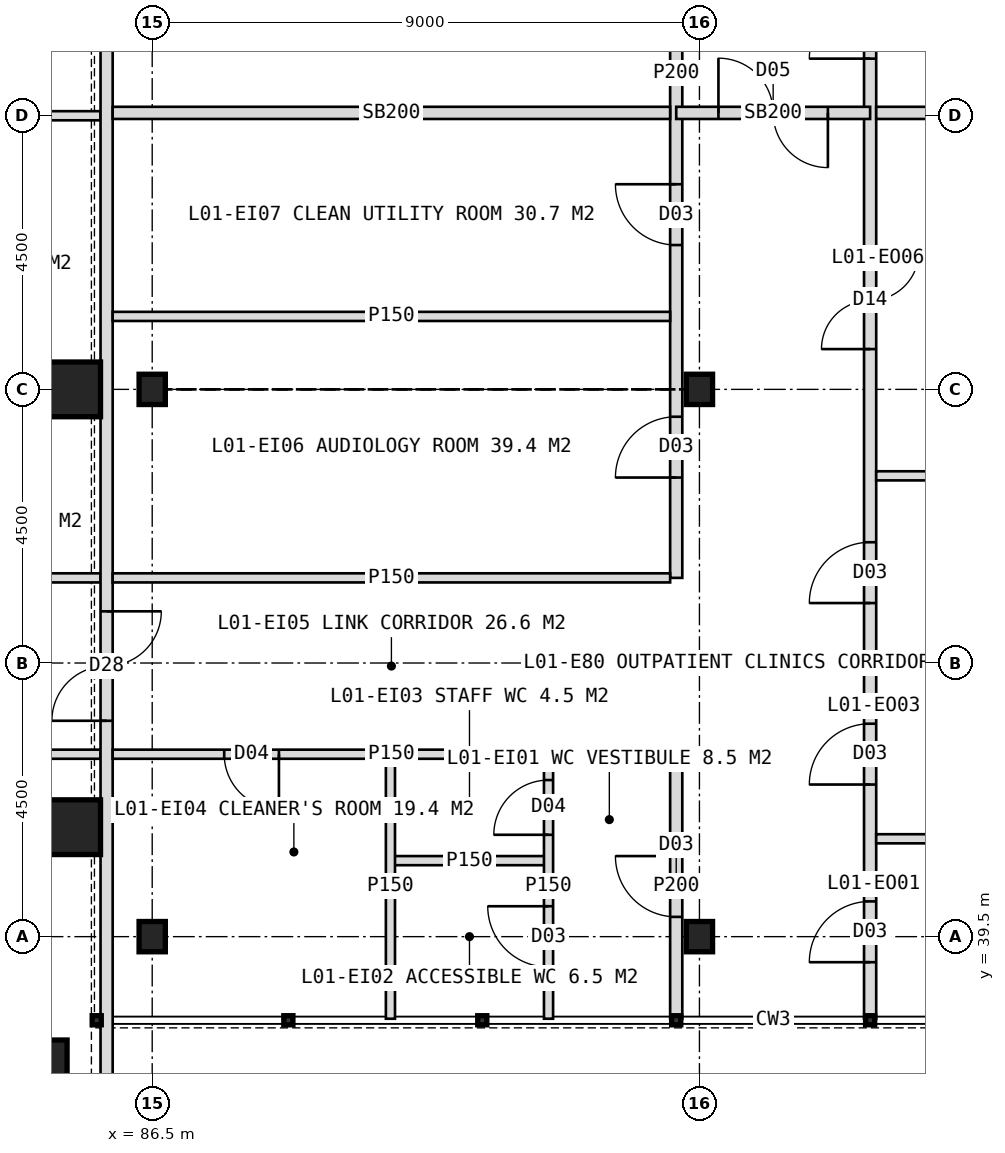
"""IFC4 building model, lengths in metres.
Left out: names, types, materials, properties, quantities, classifications, styles, units other than length and angle.
Written with IfcOpenShell. Run it as: python <this file> out.ifc"""

import sys

from ifc_helpers import new_model, si_unit, direction, frame, frame_2d, origin, origin_2d, place, context, subcontext, project, spatial, rectangle, hollow_rectangle, i_section, extrude, element, fill, save


model = new_model("IFC4")
c1 = context("Model", 3, precision=1e-05, world=origin(), true_north=direction((0.0, 1.0)))
c2 = subcontext(c1, "Body", "Model", "MODEL_VIEW")
j1 = project(units=[si_unit("LENGTHUNIT", "METRE"), si_unit("PLANEANGLEUNIT", "RADIAN")], contexts=[c1])
p1 = place(None, origin())
s1 = spatial("IfcSite", under=j1, at=p1, CompositionType="ELEMENT")
p2 = place(p1, origin())
s2 = spatial("IfcBuilding", under=s1, at=p2, CompositionType="ELEMENT")
p3 = place(p2, frame((0.0, 0.0, 6.0)))
s3 = spatial("IfcBuildingStorey", under=s2, at=p3, CompositionType="ELEMENT", Elevation=6.0)
for number, where, z_axis, x_axis in (
    (1, (85.2, 41.3, 0.0), (0.0, 0.0, 1.0), (1.0, 0.0, 0.0)),
    (2, (85.2, 48.5, 0.0), (0.0, 0.0, 1.0), (1.0, 0.0, 0.0)),
    (3, (84.65, 37.35, 0.0), (0.0, 0.0, 1.0), (1.0, 0.0, 0.0)),
):
    element("IfcColumn", number, at=place(p3, frame(where, z_axis=z_axis, x_axis=x_axis)), inside=s3, PredefinedType="COLUMN", context=c2, shape_type="SweptSolid", body=[
        extrude(hollow_rectangle(XDim=0.9, YDim=0.9, WallThickness=0.08, at=origin_2d()), origin(), (0.0, 0.0, 1.0), 5.0),
    ])
for number, where, z_axis, x_axis in (
    (4, (86.5, 39.5, 0.0), (0.0, 0.0, 1.0), (1.0, 0.0, 0.0)),
    (5, (86.5, 48.5, 0.0), (0.0, 0.0, 1.0), (1.0, 0.0, 0.0)),
    (6, (95.5, 39.5, 0.0), (0.0, 0.0, 1.0), (1.0, 0.0, 0.0)),
    (7, (95.5, 48.5, 0.0), (0.0, 0.0, 1.0), (1.0, 0.0, 0.0)),
):
    element("IfcColumn", number, at=place(p3, frame(where, z_axis=z_axis, x_axis=x_axis)), inside=s3, PredefinedType="COLUMN", context=c2, shape_type="SweptSolid", body=[
        extrude(i_section(OverallWidth=0.432, OverallDepth=0.498, WebThickness=0.056, FlangeThickness=0.089, FilletRadius=0.015, at=origin_2d()), origin(), (0.0, 0.0, 1.0), 5.0),
    ])
for number, where, z_axis, x_axis in (
    (8, (79.5, 53.0, 0.0), (0.0, 0.0, 1.0), (1.0, 0.0, 0.0)),
    (9, (79.5, 45.4, 0.0), (0.0, 0.0, 1.0), (1.0, 0.0, 0.0)),
    (10, (79.5, 42.5, 0.0), (0.0, 0.0, 1.0), (1.0, 0.0, 0.0)),
):
    element("IfcWall", number, at=place(p3, frame(where, z_axis=z_axis, x_axis=x_axis)), inside=s3, PredefinedType="PARTITIONING", context=c2, shape_type="SweptSolid", body=[
        extrude(rectangle(XDim=6.15, YDim=0.15, at=frame_2d((3.075, 0.0))), origin(), (0.0, 0.0, 1.0), 4.7),
    ])
p4 = place(p3, frame((98.307, 38.15, 0.0), z_axis=(0.0, 0.0, 1.0), x_axis=(0.0, 1.0, 0.0)))
e11 = element("IfcWall", 11, at=p4, inside=s3, PredefinedType="PARTITIONING", context=c2, shape_type="SweptSolid", body=[
    extrude(rectangle(XDim=47.7, YDim=0.2, at=frame_2d((23.85, 0.0))), origin(), (0.0, 0.0, 1.0), 4.7),
])
p5 = place(p4, frame((45.7, 0.0, 0.0)))
e12 = element("IfcOpeningElement", 12, at=p5, cuts=e11, PredefinedType="OPENING", context=c2, shape_type="SweptSolid", body=[
    extrude(rectangle(XDim=1.2, YDim=2.1, at=frame_2d((0.6, 1.05))), frame((0.0, 0.11, 0.0), z_axis=(0.0, -1.0, 0.0), x_axis=(1.0, 0.0, 0.0)), (0.0, 0.0, 1.0), 0.22),
])
p6 = place(p4, frame((36.244, 0.0, 0.0)))
e13 = element("IfcOpeningElement", 13, at=p6, cuts=e11, PredefinedType="OPENING", context=c2, shape_type="SweptSolid", body=[
    extrude(rectangle(XDim=1.0, YDim=2.1, at=frame_2d((0.5, 1.05))), frame((0.0, 0.11, 0.0), z_axis=(0.0, -1.0, 0.0), x_axis=(1.0, 0.0, 0.0)), (0.0, 0.0, 1.0), 0.22),
])
p7 = place(p4, frame((0.93, 0.0, 0.0)))
e14 = element("IfcOpeningElement", 14, at=p7, cuts=e11, PredefinedType="OPENING", context=c2, shape_type="SweptSolid", body=[
    extrude(rectangle(XDim=1.0, YDim=2.1, at=frame_2d((0.5, 1.05))), frame((0.0, 0.11, 0.0), z_axis=(0.0, -1.0, 0.0), x_axis=(1.0, 0.0, 0.0)), (0.0, 0.0, 1.0), 0.22),
])
p8 = place(p4, frame((3.852, 0.0, 0.0)))
e15 = element("IfcOpeningElement", 15, at=p8, cuts=e11, PredefinedType="OPENING", context=c2, shape_type="SweptSolid", body=[
    extrude(rectangle(XDim=1.0, YDim=2.1, at=frame_2d((0.5, 1.05))), frame((0.0, 0.11, 0.0), z_axis=(0.0, -1.0, 0.0), x_axis=(1.0, 0.0, 0.0)), (0.0, 0.0, 1.0), 0.22),
])
p9 = place(p4, frame((6.836, 0.0, 0.0)))
e16 = element("IfcOpeningElement", 16, at=p9, cuts=e11, PredefinedType="OPENING", context=c2, shape_type="SweptSolid", body=[
    extrude(rectangle(XDim=1.0, YDim=2.1, at=frame_2d((0.5, 1.05))), frame((0.0, 0.11, 0.0), z_axis=(0.0, -1.0, 0.0), x_axis=(1.0, 0.0, 0.0)), (0.0, 0.0, 1.0), 0.22),
])
p10 = place(p4, frame((11.012, 0.0, 0.0)))
e17 = element("IfcOpeningElement", 17, at=p10, cuts=e11, PredefinedType="OPENING", context=c2, shape_type="SweptSolid", body=[
    extrude(rectangle(XDim=1.6, YDim=2.2, at=frame_2d((0.8, 1.1))), frame((0.0, 0.11, 0.0), z_axis=(0.0, -1.0, 0.0), x_axis=(1.0, 0.0, 0.0)), (0.0, 0.0, 1.0), 0.22),
])
p11 = place(p4, frame((15.789, 0.0, 0.0)))
e18 = element("IfcOpeningElement", 18, at=p11, cuts=e11, PredefinedType="OPENING", context=c2, shape_type="SweptSolid", body=[
    extrude(rectangle(XDim=1.0, YDim=2.1, at=frame_2d((0.5, 1.05))), frame((0.0, 0.11, 0.0), z_axis=(0.0, -1.0, 0.0), x_axis=(1.0, 0.0, 0.0)), (0.0, 0.0, 1.0), 0.22),
])
p12 = place(p4, frame((18.773, 0.0, 0.0)))
e19 = element("IfcOpeningElement", 19, at=p12, cuts=e11, PredefinedType="OPENING", context=c2, shape_type="SweptSolid", body=[
    extrude(rectangle(XDim=1.0, YDim=2.1, at=frame_2d((0.5, 1.05))), frame((0.0, 0.11, 0.0), z_axis=(0.0, -1.0, 0.0), x_axis=(1.0, 0.0, 0.0)), (0.0, 0.0, 1.0), 0.22),
])
p13 = place(p4, frame((21.758, 0.0, 0.0)))
e20 = element("IfcOpeningElement", 20, at=p13, cuts=e11, PredefinedType="OPENING", context=c2, shape_type="SweptSolid", body=[
    extrude(rectangle(XDim=1.0, YDim=2.1, at=frame_2d((0.5, 1.05))), frame((0.0, 0.11, 0.0), z_axis=(0.0, -1.0, 0.0), x_axis=(1.0, 0.0, 0.0)), (0.0, 0.0, 1.0), 0.22),
])
p14 = place(p4, frame((26.034, 0.0, 0.0)))
e21 = element("IfcOpeningElement", 21, at=p14, cuts=e11, PredefinedType="OPENING", context=c2, shape_type="SweptSolid", body=[
    extrude(rectangle(XDim=1.4, YDim=2.2, at=frame_2d((0.7, 1.1))), frame((0.0, 0.11, 0.0), z_axis=(0.0, -1.0, 0.0), x_axis=(1.0, 0.0, 0.0)), (0.0, 0.0, 1.0), 0.22),
])
p15 = place(p4, frame((30.711, 0.0, 0.0)))
e22 = element("IfcOpeningElement", 22, at=p15, cuts=e11, PredefinedType="OPENING", context=c2, shape_type="SweptSolid", body=[
    extrude(rectangle(XDim=1.0, YDim=2.1, at=frame_2d((0.5, 1.05))), frame((0.0, 0.11, 0.0), z_axis=(0.0, -1.0, 0.0), x_axis=(1.0, 0.0, 0.0)), (0.0, 0.0, 1.0), 0.22),
])
p16 = place(p4, frame((33.695, 0.0, 0.0)))
e23 = element("IfcOpeningElement", 23, at=p16, cuts=e11, PredefinedType="OPENING", context=c2, shape_type="SweptSolid", body=[
    extrude(rectangle(XDim=1.0, YDim=2.1, at=frame_2d((0.5, 1.05))), frame((0.0, 0.11, 0.0), z_axis=(0.0, -1.0, 0.0), x_axis=(1.0, 0.0, 0.0)), (0.0, 0.0, 1.0), 0.22),
])
p17 = place(p3, frame((95.118, 38.15, 0.0), z_axis=(0.0, 0.0, 1.0), x_axis=(0.0, 1.0, 0.0)))
e24 = element("IfcWall", 24, at=p17, inside=s3, PredefinedType="PARTITIONING", context=c2, shape_type="SweptSolid", body=[
    extrude(rectangle(XDim=4.35, YDim=0.2, at=frame_2d((2.175, 0.0))), origin(), (0.0, 0.0, 1.0), 4.7),
])
p18 = place(p17, frame((1.675, 0.0, 0.0)))
e25 = element("IfcOpeningElement", 25, at=p18, cuts=e24, PredefinedType="OPENING", context=c2, shape_type="SweptSolid", body=[
    extrude(rectangle(XDim=1.0, YDim=2.1, at=frame_2d((0.5, 1.05))), frame((0.0, 0.11, 0.0), z_axis=(0.0, -1.0, 0.0), x_axis=(1.0, 0.0, 0.0)), (0.0, 0.0, 1.0), 0.22),
])
p19 = place(p3, frame((95.118, 45.4, 0.0), z_axis=(0.0, 0.0, 1.0), x_axis=(0.0, 1.0, 0.0)))
e26 = element("IfcWall", 26, at=p19, inside=s3, PredefinedType="PARTITIONING", context=c2, shape_type="SweptSolid", body=[
    extrude(rectangle(XDim=16.6, YDim=0.2, at=frame_2d((8.3, 0.0))), origin(), (0.0, 0.0, 1.0), 4.7),
])
p20 = place(p19, frame((1.65, 0.0, 0.0)))
e27 = element("IfcOpeningElement", 27, at=p20, cuts=e26, PredefinedType="OPENING", context=c2, shape_type="SweptSolid", body=[
    extrude(rectangle(XDim=1.0, YDim=2.1, at=frame_2d((0.5, 1.05))), frame((0.0, 0.11, 0.0), z_axis=(0.0, -1.0, 0.0), x_axis=(1.0, 0.0, 0.0)), (0.0, 0.0, 1.0), 0.22),
])
p21 = place(p19, frame((5.473, 0.0, 0.0)))
e28 = element("IfcOpeningElement", 28, at=p21, cuts=e26, PredefinedType="OPENING", context=c2, shape_type="SweptSolid", body=[
    extrude(rectangle(XDim=1.0, YDim=2.1, at=frame_2d((0.5, 1.05))), frame((0.0, 0.11, 0.0), z_axis=(0.0, -1.0, 0.0), x_axis=(1.0, 0.0, 0.0)), (0.0, 0.0, 1.0), 0.22),
])
p22 = place(p19, frame((9.924, 0.0, 0.0)))
e29 = element("IfcOpeningElement", 29, at=p22, cuts=e26, PredefinedType="OPENING", context=c2, shape_type="SweptSolid", body=[
    extrude(rectangle(XDim=1.0, YDim=2.1, at=frame_2d((0.5, 1.05))), frame((0.0, 0.11, 0.0), z_axis=(0.0, -1.0, 0.0), x_axis=(1.0, 0.0, 0.0)), (0.0, 0.0, 1.0), 0.22),
])
p23 = place(p19, frame((14.1, 0.0, 0.0)))
e30 = element("IfcOpeningElement", 30, at=p23, cuts=e26, PredefinedType="OPENING", context=c2, shape_type="SweptSolid", body=[
    extrude(rectangle(XDim=1.6, YDim=2.2, at=frame_2d((0.8, 1.1))), frame((0.0, 0.11, 0.0), z_axis=(0.0, -1.0, 0.0), x_axis=(1.0, 0.0, 0.0)), (0.0, 0.0, 1.0), 0.22),
])
p24 = place(p3, frame((98.307, 53.047, 0.0), z_axis=(0.0, 0.0, 1.0), x_axis=(-1.0, 0.0, 0.0)))
e31 = element("IfcWall", 31, at=p24, inside=s3, PredefinedType="SOLIDWALL", context=c2, shape_type="SweptSolid", body=[
    extrude(rectangle(XDim=3.189, YDim=0.2, at=frame_2d((1.594, 0.0))), origin(), (0.0, 0.0, 1.0), 4.7),
])
p25 = place(p24, frame((0.695, 0.0, 0.0)))
e32 = element("IfcOpeningElement", 32, at=p25, cuts=e31, PredefinedType="OPENING", context=c2, shape_type="SweptSolid", body=[
    extrude(rectangle(XDim=1.8, YDim=2.2, at=frame_2d((0.9, 1.1))), frame((0.0, 0.11, 0.0), z_axis=(0.0, -1.0, 0.0), x_axis=(1.0, 0.0, 0.0)), (0.0, 0.0, 1.0), 0.22),
])
p26 = place(p3, frame((85.75, 36.8, 0.0), z_axis=(0.0, 0.0, 1.0), x_axis=(0.0, 1.0, 0.0)))
e33 = element("IfcWall", 33, at=p26, inside=s3, PredefinedType="SOLIDWALL", context=c2, shape_type="SweptSolid", body=[
    extrude(rectangle(XDim=50.4, YDim=0.2, at=frame_2d((25.2, 0.0))), origin(), (0.0, 0.0, 1.0), 4.7),
])
p27 = place(p26, frame((6.25, 0.0, 0.0)))
e34 = element("IfcOpeningElement", 34, at=p27, cuts=e33, PredefinedType="OPENING", context=c2, shape_type="SweptSolid", body=[
    extrude(rectangle(XDim=1.8, YDim=2.2, at=frame_2d((0.9, 1.1))), frame((0.0, 0.11, 0.0), z_axis=(0.0, -1.0, 0.0), x_axis=(1.0, 0.0, 0.0)), (0.0, 0.0, 1.0), 0.22),
])
p28 = place(p26, frame((25.55, 0.0, 0.0)))
e35 = element("IfcOpeningElement", 35, at=p28, cuts=e33, PredefinedType="OPENING", context=c2, shape_type="SweptSolid", body=[
    extrude(rectangle(XDim=1.8, YDim=2.2, at=frame_2d((0.9, 1.1))), frame((0.0, 0.11, 0.0), z_axis=(0.0, -1.0, 0.0), x_axis=(1.0, 0.0, 0.0)), (0.0, 0.0, 1.0), 0.22),
])
for number, where, z_axis, x_axis in (
    (36, (107.85, 41.109, 0.0), (0.0, 0.0, 1.0), (-1.0, 0.0, 0.0)),
    (37, (107.85, 44.094, 0.0), (0.0, 0.0, 1.0), (-1.0, 0.0, 0.0)),
    (38, (107.85, 47.078, 0.0), (0.0, 0.0, 1.0), (-1.0, 0.0, 0.0)),
):
    element("IfcWall", number, at=place(p3, frame(where, z_axis=z_axis, x_axis=x_axis)), inside=s3, PredefinedType="PARTITIONING", context=c2, shape_type="SweptSolid", body=[
        extrude(rectangle(XDim=9.443, YDim=0.15, at=frame_2d((4.722, 0.0))), origin(), (0.0, 0.0, 1.0), 4.7),
    ])
p29 = place(p3, frame((107.85, 53.047, 0.0), z_axis=(0.0, 0.0, 1.0), x_axis=(-1.0, 0.0, 0.0)))
e39 = element("IfcWall", 39, at=p29, inside=s3, PredefinedType="SOLIDWALL", context=c2, shape_type="SweptSolid", body=[
    extrude(rectangle(XDim=9.443, YDim=0.2, at=frame_2d((4.722, 0.0))), origin(), (0.0, 0.0, 1.0), 4.7),
])
p30 = place(p3, frame((93.018, 40.75, 0.0), z_axis=(0.0, 0.0, 1.0), x_axis=(-1.0, 0.0, 0.0)))
e40 = element("IfcWall", 40, at=p30, inside=s3, PredefinedType="PARTITIONING", context=c2, shape_type="SweptSolid", body=[
    extrude(rectangle(XDim=2.6, YDim=0.15, at=frame_2d((1.3, 0.0))), origin(), (0.0, 0.0, 1.0), 4.7),
])
p31 = place(p3, frame((95.018, 42.5, 0.0), z_axis=(0.0, 0.0, 1.0), x_axis=(-1.0, 0.0, 0.0)))
e41 = element("IfcWall", 41, at=p31, inside=s3, PredefinedType="PARTITIONING", context=c2, shape_type="SweptSolid", body=[
    extrude(rectangle(XDim=9.168, YDim=0.15, at=frame_2d((4.584, 0.0))), origin(), (0.0, 0.0, 1.0), 4.7),
])
p32 = place(p31, frame((6.434, 0.0, 0.0)))
e42 = element("IfcOpeningElement", 42, at=p32, cuts=e41, PredefinedType="OPENING", context=c2, shape_type="SweptSolid", body=[
    extrude(rectangle(XDim=0.9, YDim=2.1, at=frame_2d((0.45, 1.05))), frame((0.0, 0.085, 0.0), z_axis=(0.0, -1.0, 0.0), x_axis=(1.0, 0.0, 0.0)), (0.0, 0.0, 1.0), 0.17),
])
for number, where, z_axis, x_axis in (
    (43, (95.018, 45.4, 0.0), (0.0, 0.0, 1.0), (-1.0, 0.0, 0.0)),
    (44, (95.018, 49.7, 0.0), (0.0, 0.0, 1.0), (-1.0, 0.0, 0.0)),
):
    element("IfcWall", number, at=place(p3, frame(where, z_axis=z_axis, x_axis=x_axis)), inside=s3, PredefinedType="PARTITIONING", context=c2, shape_type="SweptSolid", body=[
        extrude(rectangle(XDim=9.168, YDim=0.15, at=frame_2d((4.584, 0.0))), origin(), (0.0, 0.0, 1.0), 4.7),
    ])
p33 = place(p3, frame((95.018, 53.047, 0.0), z_axis=(0.0, 0.0, 1.0), x_axis=(-1.0, 0.0, 0.0)))
e45 = element("IfcWall", 45, at=p33, inside=s3, PredefinedType="SOLIDWALL", context=c2, shape_type="SweptSolid", body=[
    extrude(rectangle(XDim=9.168, YDim=0.2, at=frame_2d((4.584, 0.0))), origin(), (0.0, 0.0, 1.0), 4.7),
])
p34 = place(p3, frame((93.018, 38.15, 0.0), z_axis=(0.0, 0.0, 1.0), x_axis=(0.0, 1.0, 0.0)))
e46 = element("IfcWall", 46, at=p34, inside=s3, PredefinedType="PARTITIONING", context=c2, shape_type="SweptSolid", body=[
    extrude(rectangle(XDim=4.35, YDim=0.15, at=frame_2d((2.175, 0.0))), origin(), (0.0, 0.0, 1.0), 4.7),
])
p35 = place(p34, frame((0.85, 0.0, 0.0)))
e47 = element("IfcOpeningElement", 47, at=p35, cuts=e46, PredefinedType="OPENING", context=c2, shape_type="SweptSolid", body=[
    extrude(rectangle(XDim=1.0, YDim=2.1, at=frame_2d((0.5, 1.05))), frame((0.0, 0.085, 0.0), z_axis=(0.0, -1.0, 0.0), x_axis=(1.0, 0.0, 0.0)), (0.0, 0.0, 1.0), 0.17),
])
p36 = place(p34, frame((3.025, 0.0, 0.0)))
e48 = element("IfcOpeningElement", 48, at=p36, cuts=e46, PredefinedType="OPENING", context=c2, shape_type="SweptSolid", body=[
    extrude(rectangle(XDim=0.9, YDim=2.1, at=frame_2d((0.45, 1.05))), frame((0.0, 0.085, 0.0), z_axis=(0.0, -1.0, 0.0), x_axis=(1.0, 0.0, 0.0)), (0.0, 0.0, 1.0), 0.17),
])
p37 = place(p3, frame((90.418, 38.15, 0.0), z_axis=(0.0, 0.0, 1.0), x_axis=(0.0, 1.0, 0.0)))
e49 = element("IfcWall", 49, at=p37, inside=s3, PredefinedType="PARTITIONING", context=c2, shape_type="SweptSolid", body=[
    extrude(rectangle(XDim=4.35, YDim=0.15, at=frame_2d((2.175, 0.0))), origin(), (0.0, 0.0, 1.0), 4.7),
])
p38 = place(p25, origin())
e50 = element("IfcDoor", 50, at=p38, inside=s3, OperationType="DOUBLE_DOOR_DOUBLE_SWING", PredefinedType="DOOR", context=c2, shape_type="SweptSolid", body=[
    extrude(rectangle(XDim=1.8, YDim=2.2, at=frame_2d((0.9, 1.1))), frame((0.0, 0.025, 0.0), z_axis=(0.0, -1.0, 0.0), x_axis=(1.0, 0.0, 0.0)), (0.0, 0.0, 1.0), 0.05),
])
fill(e32, e50)
p39 = place(p27, origin())
e51 = element("IfcDoor", 51, at=p39, inside=s3, OperationType="DOUBLE_DOOR_SINGLE_SWING", PredefinedType="DOOR", context=c2, shape_type="SweptSolid", body=[
    extrude(rectangle(XDim=1.8, YDim=2.2, at=frame_2d((0.9, 1.1))), frame((0.0, 0.025, 0.0), z_axis=(0.0, -1.0, 0.0), x_axis=(1.0, 0.0, 0.0)), (0.0, 0.0, 1.0), 0.05),
])
fill(e34, e51)
p40 = place(p7, origin())
e52 = element("IfcDoor", 52, at=p40, inside=s3, OperationType="SINGLE_SWING_LEFT", PredefinedType="DOOR", context=c2, shape_type="SweptSolid", body=[
    extrude(rectangle(XDim=1.0, YDim=2.1, at=frame_2d((0.5, 1.05))), frame((0.0, 0.025, 0.0), z_axis=(0.0, -1.0, 0.0), x_axis=(1.0, 0.0, 0.0)), (0.0, 0.0, 1.0), 0.05),
])
fill(e14, e52)
p41 = place(p8, origin())
e53 = element("IfcDoor", 53, at=p41, inside=s3, OperationType="SINGLE_SWING_LEFT", PredefinedType="DOOR", context=c2, shape_type="SweptSolid", body=[
    extrude(rectangle(XDim=1.0, YDim=2.1, at=frame_2d((0.5, 1.05))), frame((0.0, 0.025, 0.0), z_axis=(0.0, -1.0, 0.0), x_axis=(1.0, 0.0, 0.0)), (0.0, 0.0, 1.0), 0.05),
])
fill(e15, e53)
p42 = place(p9, origin())
e54 = element("IfcDoor", 54, at=p42, inside=s3, OperationType="SINGLE_SWING_LEFT", PredefinedType="DOOR", context=c2, shape_type="SweptSolid", body=[
    extrude(rectangle(XDim=1.0, YDim=2.1, at=frame_2d((0.5, 1.05))), frame((0.0, 0.025, 0.0), z_axis=(0.0, -1.0, 0.0), x_axis=(1.0, 0.0, 0.0)), (0.0, 0.0, 1.0), 0.05),
])
fill(e16, e54)
p43 = place(p10, origin())
e55 = element("IfcDoor", 55, at=p43, inside=s3, OperationType="DOUBLE_DOOR_DOUBLE_SWING", PredefinedType="DOOR", context=c2, shape_type="SweptSolid", body=[
    extrude(rectangle(XDim=1.6, YDim=2.2, at=frame_2d((0.8, 1.1))), frame((0.0, 0.025, 0.0), z_axis=(0.0, -1.0, 0.0), x_axis=(1.0, 0.0, 0.0)), (0.0, 0.0, 1.0), 0.05),
])
fill(e17, e55)
p44 = place(p11, origin())
e56 = element("IfcDoor", 56, at=p44, inside=s3, OperationType="SINGLE_SWING_LEFT", PredefinedType="DOOR", context=c2, shape_type="SweptSolid", body=[
    extrude(rectangle(XDim=1.0, YDim=2.1, at=frame_2d((0.5, 1.05))), frame((0.0, 0.025, 0.0), z_axis=(0.0, -1.0, 0.0), x_axis=(1.0, 0.0, 0.0)), (0.0, 0.0, 1.0), 0.05),
])
fill(e18, e56)
p45 = place(p18, origin())
e57 = element("IfcDoor", 57, at=p45, inside=s3, OperationType="SINGLE_SWING_RIGHT", PredefinedType="DOOR", context=c2, shape_type="SweptSolid", body=[
    extrude(rectangle(XDim=1.0, YDim=2.1, at=frame_2d((0.5, 1.05))), frame((0.0, 0.025, 0.0), z_axis=(0.0, -1.0, 0.0), x_axis=(1.0, 0.0, 0.0)), (0.0, 0.0, 1.0), 0.05),
])
fill(e25, e57)
p46 = place(p35, origin())
e58 = element("IfcDoor", 58, at=p46, inside=s3, OperationType="SINGLE_SWING_RIGHT", PredefinedType="DOOR", context=c2, shape_type="SweptSolid", body=[
    extrude(rectangle(XDim=1.0, YDim=2.1, at=frame_2d((0.5, 1.05))), frame((0.0, 0.025, 0.0), z_axis=(0.0, -1.0, 0.0), x_axis=(1.0, 0.0, 0.0)), (0.0, 0.0, 1.0), 0.05),
])
fill(e47, e58)
p47 = place(p36, origin())
e59 = element("IfcDoor", 59, at=p47, inside=s3, OperationType="SINGLE_SWING_LEFT", PredefinedType="DOOR", context=c2, shape_type="SweptSolid", body=[
    extrude(rectangle(XDim=0.9, YDim=2.1, at=frame_2d((0.45, 1.05))), frame((0.0, 0.025, 0.0), z_axis=(0.0, -1.0, 0.0), x_axis=(1.0, 0.0, 0.0)), (0.0, 0.0, 1.0), 0.05),
])
fill(e48, e59)
p48 = place(p32, origin())
e60 = element("IfcDoor", 60, at=p48, inside=s3, OperationType="SINGLE_SWING_LEFT", PredefinedType="DOOR", context=c2, shape_type="SweptSolid", body=[
    extrude(rectangle(XDim=0.9, YDim=2.1, at=frame_2d((0.45, 1.05))), frame((0.0, 0.025, 0.0), z_axis=(0.0, -1.0, 0.0), x_axis=(1.0, 0.0, 0.0)), (0.0, 0.0, 1.0), 0.05),
])
fill(e42, e60)
p49 = place(p20, origin())
e61 = element("IfcDoor", 61, at=p49, inside=s3, OperationType="SINGLE_SWING_LEFT", PredefinedType="DOOR", context=c2, shape_type="SweptSolid", body=[
    extrude(rectangle(XDim=1.0, YDim=2.1, at=frame_2d((0.5, 1.05))), frame((0.0, 0.025, 0.0), z_axis=(0.0, -1.0, 0.0), x_axis=(1.0, 0.0, 0.0)), (0.0, 0.0, 1.0), 0.05),
])
fill(e27, e61)
p50 = place(p21, origin())
e62 = element("IfcDoor", 62, at=p50, inside=s3, OperationType="SINGLE_SWING_RIGHT", PredefinedType="DOOR", context=c2, shape_type="SweptSolid", body=[
    extrude(rectangle(XDim=1.0, YDim=2.1, at=frame_2d((0.5, 1.05))), frame((0.0, 0.025, 0.0), z_axis=(0.0, -1.0, 0.0), x_axis=(1.0, 0.0, 0.0)), (0.0, 0.0, 1.0), 0.05),
])
fill(e28, e62)
save(model, sys.argv[1])
